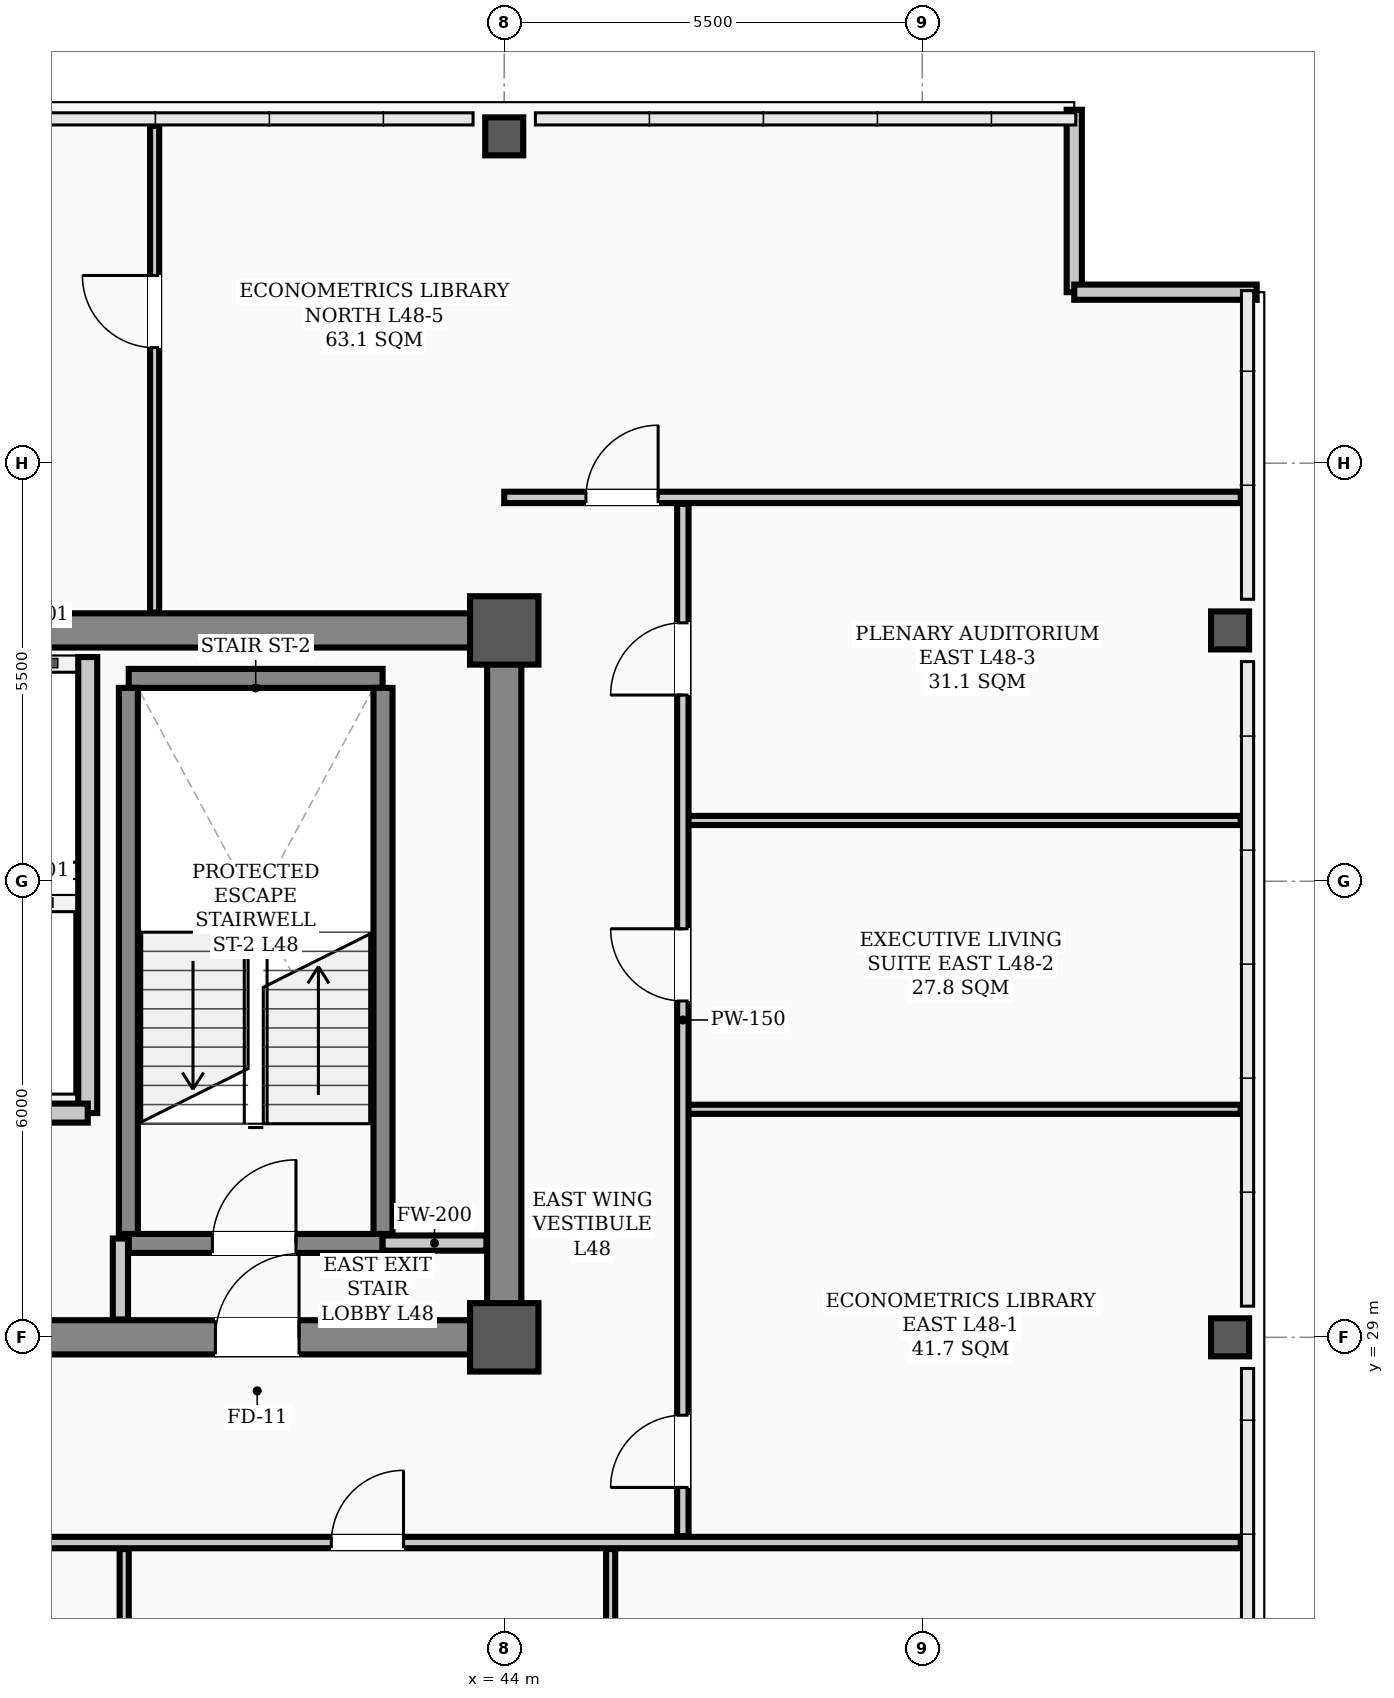
"""IFC4 building model, lengths in metres.
Left out: names, types, materials, properties, quantities, classifications, styles, units other than length and angle.
Written with IfcOpenShell. Run it as: python <this file> out.ifc"""

import sys

from ifc_helpers import new_model, si_unit, direction, frame, frame_2d, origin, origin_2d, place, context, subcontext, project, spatial, rectangle, hollow_rectangle, extrude, element, fill, save


model = new_model("IFC4")
c1 = context("Model", 3, precision=1e-05, world=origin(), true_north=direction((0.0, 1.0)))
c2 = subcontext(c1, "Body", "Model", "MODEL_VIEW")
j1 = project(units=[si_unit("LENGTHUNIT", "METRE"), si_unit("PLANEANGLEUNIT", "RADIAN")], contexts=[c1])
p1 = place(None, origin())
s1 = spatial("IfcSite", under=j1, at=p1, CompositionType="ELEMENT")
p2 = place(p1, origin())
s2 = spatial("IfcBuilding", under=s1, at=p2, CompositionType="ELEMENT")
p3 = place(p2, frame((0.0, 0.0, 192.9)))
s3 = spatial("IfcBuildingStorey", under=s2, at=p3, CompositionType="ELEMENT", Elevation=192.9)
for number, where, z_axis, x_axis in (
    (1, (44.0, 29.0, 0.0), (0.0, 0.0, 1.0), (1.0, 0.0, 0.0)),
    (2, (44.0, 38.3, 0.0), (0.0, 0.0, 1.0), (1.0, 0.0, 0.0)),
):
    element("IfcColumn", number, at=place(p3, frame(where, z_axis=z_axis, x_axis=x_axis)), inside=s3, PredefinedType="COLUMN", context=c2, shape_type="SweptSolid", body=[
        extrude(hollow_rectangle(XDim=0.9, YDim=0.9, WallThickness=0.035, InnerFilletRadius=0.017, OuterFilletRadius=0.052, at=origin_2d()), origin(), (0.0, 0.0, 1.0), 3.9),
    ])
p4 = place(p3, frame((44.0, 44.8, 0.0), z_axis=(0.0, 0.0, 1.0), x_axis=(1.0, 0.0, 0.0)))
e3 = element("IfcColumn", 3, at=p4, inside=s3, PredefinedType="COLUMN", context=c2, shape_type="SweptSolid", body=[
    extrude(hollow_rectangle(XDim=0.5, YDim=0.5, WallThickness=0.024, InnerFilletRadius=0.012, OuterFilletRadius=0.036, at=origin_2d()), origin(), (0.0, 0.0, 1.0), 3.66),
])
for number, where, z_axis, x_axis in (
    (4, (53.55, 29.0, 0.0), (0.0, 0.0, 1.0), (1.0, 0.0, 0.0)),
    (5, (53.55, 38.3, 0.0), (0.0, 0.0, 1.0), (1.0, 0.0, 0.0)),
):
    element("IfcColumn", number, at=place(p3, frame(where, z_axis=z_axis, x_axis=x_axis)), inside=s3, PredefinedType="COLUMN", context=c2, shape_type="SweptSolid", body=[
        extrude(hollow_rectangle(XDim=0.5, YDim=0.5, WallThickness=0.024, InnerFilletRadius=0.012, OuterFilletRadius=0.036, at=origin_2d()), origin(), (0.0, 0.0, 1.0), 3.9),
    ])
for number, where, z_axis, x_axis in (
    (6, (51.5, 45.15, 0.0), (0.0, 0.0, 1.0), (0.0, -1.0, 0.0)),
    (7, (51.5, 42.75, 0.0), (0.0, 0.0, 1.0), (1.0, 0.0, 0.0)),
):
    element("IfcWall", number, at=place(p3, frame(where, z_axis=z_axis, x_axis=x_axis)), inside=s3, PredefinedType="PARAPET", context=c2, shape_type="SweptSolid", body=[
        extrude(rectangle(XDim=2.4, YDim=0.2, at=frame_2d((1.2, 0.0))), origin(), (0.0, 0.0, 1.0), 1.2),
    ])
p5 = place(p3, frame((13.5, 29.0, 0.0), z_axis=(0.0, 0.0, 1.0), x_axis=(1.0, 0.0, 0.0)))
e8 = element("IfcWall", 8, at=p5, inside=s3, PredefinedType="SHEAR", context=c2, shape_type="SweptSolid", body=[
    extrude(rectangle(XDim=30.5, YDim=0.45, at=frame_2d((15.25, 0.0))), origin(), (0.0, 0.0, 1.0), 3.66),
])
p6 = place(p5, frame((1.75, 0.0, 0.0)))
e9 = element("IfcOpeningElement", 9, at=p6, cuts=e8, PredefinedType="OPENING", context=c2, shape_type="SweptSolid", body=[
    extrude(rectangle(XDim=1.1, YDim=2.08, at=frame_2d((0.55, 1.04))), frame((0.0, 0.235, 0.0), z_axis=(0.0, -1.0, 0.0), x_axis=(1.0, 0.0, 0.0)), (0.0, 0.0, 1.0), 0.47),
])
p7 = place(p5, frame((26.7, 0.0, 0.0)))
e10 = element("IfcOpeningElement", 10, at=p7, cuts=e8, PredefinedType="OPENING", context=c2, shape_type="SweptSolid", body=[
    extrude(rectangle(XDim=1.1, YDim=2.08, at=frame_2d((0.55, 1.04))), frame((0.0, 0.235, 0.0), z_axis=(0.0, -1.0, 0.0), x_axis=(1.0, 0.0, 0.0)), (0.0, 0.0, 1.0), 0.47),
])
p8 = place(p5, frame((6.8, 0.0, 0.0)))
e11 = element("IfcOpeningElement", 11, at=p8, cuts=e8, PredefinedType="OPENING", context=c2, shape_type="SweptSolid", body=[
    extrude(rectangle(XDim=1.1, YDim=2.08, at=frame_2d((0.55, 1.04))), frame((0.0, 0.235, 0.0), z_axis=(0.0, -1.0, 0.0), x_axis=(1.0, 0.0, 0.0)), (0.0, 0.0, 1.0), 0.47),
])
p9 = place(p5, frame((13.2, 0.0, 0.0)))
e12 = element("IfcOpeningElement", 12, at=p9, cuts=e8, PredefinedType="OPENING", context=c2, shape_type="SweptSolid", body=[
    extrude(rectangle(XDim=1.6, YDim=2.08, at=frame_2d((0.8, 1.04))), frame((0.0, 0.235, 0.0), z_axis=(0.0, -1.0, 0.0), x_axis=(1.0, 0.0, 0.0)), (0.0, 0.0, 1.0), 0.47),
])
p10 = place(p5, frame((19.53, 0.0, 0.0)))
e13 = element("IfcOpeningElement", 13, at=p10, cuts=e8, PredefinedType="OPENING", context=c2, shape_type="SweptSolid", body=[
    extrude(rectangle(XDim=0.9, YDim=2.08, at=frame_2d((0.45, 1.04))), frame((0.0, 0.235, 0.0), z_axis=(0.0, -1.0, 0.0), x_axis=(1.0, 0.0, 0.0)), (0.0, 0.0, 1.0), 0.47),
])
p11 = place(p5, frame((21.57, 0.0, 0.0)))
e14 = element("IfcOpeningElement", 14, at=p11, cuts=e8, PredefinedType="OPENING", context=c2, shape_type="SweptSolid", body=[
    extrude(rectangle(XDim=0.9, YDim=2.08, at=frame_2d((0.45, 1.04))), frame((0.0, 0.235, 0.0), z_axis=(0.0, -1.0, 0.0), x_axis=(1.0, 0.0, 0.0)), (0.0, 0.0, 1.0), 0.47),
])
p12 = place(p3, frame((13.5, 38.3, 0.0), z_axis=(0.0, 0.0, 1.0), x_axis=(1.0, 0.0, 0.0)))
e15 = element("IfcWall", 15, at=p12, inside=s3, PredefinedType="SHEAR", context=c2, shape_type="SweptSolid", body=[
    extrude(rectangle(XDim=30.5, YDim=0.45, at=frame_2d((15.25, 0.0))), origin(), (0.0, 0.0, 1.0), 3.66),
])
p13 = place(p3, frame((44.0, 29.35, 0.0), z_axis=(0.0, 0.0, 1.0), x_axis=(0.0, 1.0, 0.0)))
e16 = element("IfcWall", 16, at=p13, inside=s3, PredefinedType="SHEAR", context=c2, shape_type="SweptSolid", body=[
    extrude(rectangle(XDim=8.6, YDim=0.45, at=frame_2d((4.3, 0.0))), origin(), (0.0, 0.0, 1.0), 3.66),
])
p14 = place(p3, frame((39.06, 30.235, 0.0), z_axis=(0.0, 0.0, 1.0), x_axis=(1.0, 0.0, 0.0)))
e17 = element("IfcWall", 17, at=p14, inside=s3, PredefinedType="STANDARD", context=c2, shape_type="SweptSolid", body=[
    extrude(rectangle(XDim=3.34, YDim=0.25, at=frame_2d((1.67, 0.0))), origin(), (0.0, 0.0, 1.0), 3.66),
])
p15 = place(p14, frame((1.1, 0.0, 0.0)))
e18 = element("IfcOpeningElement", 18, at=p15, cuts=e17, PredefinedType="OPENING", context=c2, shape_type="SweptSolid", body=[
    extrude(rectangle(XDim=1.1, YDim=2.08, at=frame_2d((0.55, 1.04))), frame((0.0, 0.135, 0.0), z_axis=(0.0, -1.0, 0.0), x_axis=(1.0, 0.0, 0.0)), (0.0, 0.0, 1.0), 0.27),
])
p16 = place(p3, frame((39.06, 37.669, 0.0), z_axis=(0.0, 0.0, 1.0), x_axis=(1.0, 0.0, 0.0)))
e19 = element("IfcWall", 19, at=p16, inside=s3, PredefinedType="STANDARD", context=c2, shape_type="SweptSolid", body=[
    extrude(rectangle(XDim=3.34, YDim=0.25, at=frame_2d((1.67, 0.0))), origin(), (0.0, 0.0, 1.0), 3.66),
])
for number, where, z_axis, x_axis in (
    (20, (39.055, 30.36, 0.0), (0.0, 0.0, 1.0), (0.0, 1.0, 0.0)),
    (21, (42.405, 30.36, 0.0), (0.0, 0.0, 1.0), (0.0, 1.0, 0.0)),
):
    element("IfcWall", number, at=place(p3, frame(where, z_axis=z_axis, x_axis=x_axis)), inside=s3, PredefinedType="STANDARD", context=c2, shape_type="SweptSolid", body=[
        extrude(rectangle(XDim=7.184, YDim=0.25, at=frame_2d((3.592, 0.0))), origin(), (0.0, 0.0, 1.0), 3.66),
    ])
p17 = place(p3, frame((38.52, 31.95, 0.0), z_axis=(0.0, 0.0, 1.0), x_axis=(0.0, 1.0, 0.0)))
e22 = element("IfcWall", 22, at=p17, inside=s3, PredefinedType="STANDARD", context=c2, shape_type="SweptSolid", body=[
    extrude(rectangle(XDim=6.0, YDim=0.25, at=frame_2d((3.0, 0.0))), origin(), (0.0, 0.0, 1.0), 2.24),
])
p18 = place(p3, frame((36.62, 31.95, 0.0), z_axis=(0.0, 0.0, 1.0), x_axis=(1.0, 0.0, 0.0)))
e23 = element("IfcWall", 23, at=p18, inside=s3, PredefinedType="STANDARD", context=c2, shape_type="SweptSolid", body=[
    extrude(rectangle(XDim=1.9, YDim=0.25, at=frame_2d((0.95, 0.0))), origin(), (0.0, 0.0, 1.0), 3.48),
])
p19 = place(p3, frame((42.4, 30.24, 0.0), z_axis=(0.0, 0.0, 1.0), x_axis=(1.0, 0.0, 0.0)))
e24 = element("IfcWall", 24, at=p19, inside=s3, PredefinedType="STANDARD", context=c2, shape_type="SweptSolid", body=[
    extrude(rectangle(XDim=1.365, YDim=0.2, at=frame_2d((0.683, 0.0))), origin(), (0.0, 0.0, 1.0), 2.24),
])
p20 = place(p3, frame((10.31, 26.3, 0.0), z_axis=(0.0, 0.0, 1.0), x_axis=(1.0, 0.0, 0.0)))
e25 = element("IfcWall", 25, at=p20, inside=s3, PredefinedType="PARTITIONING", context=c2, shape_type="SweptSolid", body=[
    extrude(rectangle(XDim=43.38, YDim=0.15, at=frame_2d((21.69, 0.0))), origin(), (0.0, 0.0, 1.0), 2.24),
])
p21 = place(p20, frame((4.47, 0.0, 0.0)))
e26 = element("IfcOpeningElement", 26, at=p21, cuts=e25, PredefinedType="OPENING", context=c2, shape_type="SweptSolid", body=[
    extrude(rectangle(XDim=0.95, YDim=2.08, at=frame_2d((0.475, 1.04))), frame((0.0, 0.085, 0.0), z_axis=(0.0, -1.0, 0.0), x_axis=(1.0, 0.0, 0.0)), (0.0, 0.0, 1.0), 0.17),
])
p22 = place(p20, frame((10.815, 0.0, 0.0)))
e27 = element("IfcOpeningElement", 27, at=p22, cuts=e25, PredefinedType="OPENING", context=c2, shape_type="SweptSolid", body=[
    extrude(rectangle(XDim=0.95, YDim=2.08, at=frame_2d((0.475, 1.04))), frame((0.0, 0.085, 0.0), z_axis=(0.0, -1.0, 0.0), x_axis=(1.0, 0.0, 0.0)), (0.0, 0.0, 1.0), 0.17),
])
p23 = place(p20, frame((17.715, 0.0, 0.0)))
e28 = element("IfcOpeningElement", 28, at=p23, cuts=e25, PredefinedType="OPENING", context=c2, shape_type="SweptSolid", body=[
    extrude(rectangle(XDim=0.95, YDim=2.08, at=frame_2d((0.475, 1.04))), frame((0.0, 0.085, 0.0), z_axis=(0.0, -1.0, 0.0), x_axis=(1.0, 0.0, 0.0)), (0.0, 0.0, 1.0), 0.17),
])
p24 = place(p20, frame((24.815, 0.0, 0.0)))
e29 = element("IfcOpeningElement", 29, at=p24, cuts=e25, PredefinedType="OPENING", context=c2, shape_type="SweptSolid", body=[
    extrude(rectangle(XDim=0.95, YDim=2.08, at=frame_2d((0.475, 1.04))), frame((0.0, 0.085, 0.0), z_axis=(0.0, -1.0, 0.0), x_axis=(1.0, 0.0, 0.0)), (0.0, 0.0, 1.0), 0.17),
])
p25 = place(p20, frame((31.415, 0.0, 0.0)))
e30 = element("IfcOpeningElement", 30, at=p25, cuts=e25, PredefinedType="OPENING", context=c2, shape_type="SweptSolid", body=[
    extrude(rectangle(XDim=0.95, YDim=2.08, at=frame_2d((0.475, 1.04))), frame((0.0, 0.085, 0.0), z_axis=(0.0, -1.0, 0.0), x_axis=(1.0, 0.0, 0.0)), (0.0, 0.0, 1.0), 0.17),
])
for number, where, z_axis, x_axis in (
    (31, (46.35, 32.0, 0.0), (0.0, 0.0, 1.0), (1.0, 0.0, 0.0)),
    (32, (46.35, 35.8, 0.0), (0.0, 0.0, 1.0), (1.0, 0.0, 0.0)),
):
    element("IfcWall", number, at=place(p3, frame(where, z_axis=z_axis, x_axis=x_axis)), inside=s3, PredefinedType="PARTITIONING", context=c2, shape_type="SweptSolid", body=[
        extrude(rectangle(XDim=7.34, YDim=0.12, at=frame_2d((3.67, 0.0))), origin(), (0.0, 0.0, 1.0), 3.66),
    ])
p26 = place(p3, frame((44.0, 40.05, 0.0), z_axis=(0.0, 0.0, 1.0), x_axis=(1.0, 0.0, 0.0)))
e33 = element("IfcWall", 33, at=p26, inside=s3, PredefinedType="PARTITIONING", context=c2, shape_type="SweptSolid", body=[
    extrude(rectangle(XDim=9.69, YDim=0.15, at=frame_2d((4.845, 0.0))), origin(), (0.0, 0.0, 1.0), 2.24),
])
p27 = place(p26, frame((1.075, 0.0, 0.0)))
e34 = element("IfcOpeningElement", 34, at=p27, cuts=e33, PredefinedType="OPENING", context=c2, shape_type="SweptSolid", body=[
    extrude(rectangle(XDim=0.95, YDim=2.08, at=frame_2d((0.475, 1.04))), frame((0.0, 0.085, 0.0), z_axis=(0.0, -1.0, 0.0), x_axis=(1.0, 0.0, 0.0)), (0.0, 0.0, 1.0), 0.17),
])
p28 = place(p3, frame((38.95, 29.235, 0.0), z_axis=(0.0, 0.0, 1.0), x_axis=(0.0, 1.0, 0.0)))
e35 = element("IfcWall", 35, at=p28, inside=s3, PredefinedType="STANDARD", context=c2, shape_type="SweptSolid", body=[
    extrude(rectangle(XDim=1.065, YDim=0.2, at=frame_2d((0.532, 0.0))), origin(), (0.0, 0.0, 1.0), 2.24),
])
p29 = place(p3, frame((46.35, 26.385, 0.0), z_axis=(0.0, 0.0, 1.0), x_axis=(0.0, 1.0, 0.0)))
e36 = element("IfcWall", 36, at=p29, inside=s3, PredefinedType="PARTITIONING", context=c2, shape_type="SweptSolid", body=[
    extrude(rectangle(XDim=13.58, YDim=0.15, at=frame_2d((6.79, 0.0))), origin(), (0.0, 0.0, 1.0), 2.24),
])
p30 = place(p29, frame((0.64, 0.0, 0.0)))
e37 = element("IfcOpeningElement", 37, at=p30, cuts=e36, PredefinedType="OPENING", context=c2, shape_type="SweptSolid", body=[
    extrude(rectangle(XDim=0.95, YDim=2.08, at=frame_2d((0.475, 1.04))), frame((0.0, 0.085, 0.0), z_axis=(0.0, -1.0, 0.0), x_axis=(1.0, 0.0, 0.0)), (0.0, 0.0, 1.0), 0.17),
])
p31 = place(p29, frame((7.04, 0.0, 0.0)))
e38 = element("IfcOpeningElement", 38, at=p31, cuts=e36, PredefinedType="OPENING", context=c2, shape_type="SweptSolid", body=[
    extrude(rectangle(XDim=0.95, YDim=2.08, at=frame_2d((0.475, 1.04))), frame((0.0, 0.085, 0.0), z_axis=(0.0, -1.0, 0.0), x_axis=(1.0, 0.0, 0.0)), (0.0, 0.0, 1.0), 0.17),
])
p32 = place(p29, frame((11.065, 0.0, 0.0)))
e39 = element("IfcOpeningElement", 39, at=p32, cuts=e36, PredefinedType="OPENING", context=c2, shape_type="SweptSolid", body=[
    extrude(rectangle(XDim=0.95, YDim=2.08, at=frame_2d((0.475, 1.04))), frame((0.0, 0.085, 0.0), z_axis=(0.0, -1.0, 0.0), x_axis=(1.0, 0.0, 0.0)), (0.0, 0.0, 1.0), 0.17),
])
p33 = place(p3, frame((39.0, 17.06, 0.0), z_axis=(0.0, 0.0, 1.0), x_axis=(0.0, 1.0, 0.0)))
e40 = element("IfcWall", 40, at=p33, inside=s3, PredefinedType="PARTITIONING", context=c2, shape_type="SweptSolid", body=[
    extrude(rectangle(XDim=9.155, YDim=0.12, at=frame_2d((4.578, 0.0))), origin(), (0.0, 0.0, 1.0), 2.24),
])
p34 = place(p3, frame((45.4, 17.06, 0.0), z_axis=(0.0, 0.0, 1.0), x_axis=(0.0, 1.0, 0.0)))
e41 = element("IfcWall", 41, at=p34, inside=s3, PredefinedType="PARTITIONING", context=c2, shape_type="SweptSolid", body=[
    extrude(rectangle(XDim=9.155, YDim=0.12, at=frame_2d((4.578, 0.0))), origin(), (0.0, 0.0, 1.0), 2.24),
])
p35 = place(p34, frame((7.165, 0.0, 0.0)))
e42 = element("IfcOpeningElement", 42, at=p35, cuts=e41, PredefinedType="OPENING", context=c2, shape_type="SweptSolid", body=[
    extrude(rectangle(XDim=0.95, YDim=2.08, at=frame_2d((0.475, 1.04))), frame((0.0, 0.07, 0.0), z_axis=(0.0, -1.0, 0.0), x_axis=(1.0, 0.0, 0.0)), (0.0, 0.0, 1.0), 0.14),
])
p36 = place(p3, frame((39.4, 38.535, 0.0), z_axis=(0.0, 0.0, 1.0), x_axis=(0.0, 1.0, 0.0)))
e43 = element("IfcWall", 43, at=p36, inside=s3, PredefinedType="PARTITIONING", context=c2, shape_type="SweptSolid", body=[
    extrude(rectangle(XDim=6.405, YDim=0.12, at=frame_2d((3.203, 0.0))), origin(), (0.0, 0.0, 1.0), 2.24),
])
p37 = place(p36, frame((3.485, 0.0, 0.0)))
e44 = element("IfcOpeningElement", 44, at=p37, cuts=e43, PredefinedType="OPENING", context=c2, shape_type="SweptSolid", body=[
    extrude(rectangle(XDim=0.95, YDim=2.08, at=frame_2d((0.475, 1.04))), frame((0.0, 0.07, 0.0), z_axis=(0.0, -1.0, 0.0), x_axis=(1.0, 0.0, 0.0)), (0.0, 0.0, 1.0), 0.14),
])
p38 = place(p15, origin())
e45 = element("IfcDoor", 45, at=p38, inside=s3, OperationType="SINGLE_SWING_RIGHT", PredefinedType="DOOR", context=c2, shape_type="SweptSolid", body=[
    extrude(rectangle(XDim=1.1, YDim=2.08, at=frame_2d((0.55, 1.04))), frame((0.0, 0.025, 0.0), z_axis=(0.0, -1.0, 0.0), x_axis=(1.0, 0.0, 0.0)), (0.0, 0.0, 1.0), 0.05),
])
fill(e18, e45)
p39 = place(p7, origin())
e46 = element("IfcDoor", 46, at=p39, inside=s3, OperationType="SINGLE_SWING_RIGHT", PredefinedType="DOOR", context=c2, shape_type="SweptSolid", body=[
    extrude(rectangle(XDim=1.1, YDim=2.08, at=frame_2d((0.55, 1.04))), frame((0.0, 0.025, 0.0), z_axis=(0.0, -1.0, 0.0), x_axis=(1.0, 0.0, 0.0)), (0.0, 0.0, 1.0), 0.05),
])
fill(e10, e46)
p40 = place(p25, origin())
e47 = element("IfcDoor", 47, at=p40, inside=s3, OperationType="SINGLE_SWING_RIGHT", PredefinedType="DOOR", context=c2, shape_type="SweptSolid", body=[
    extrude(rectangle(XDim=0.95, YDim=2.08, at=frame_2d((0.475, 1.04))), frame((0.0, 0.025, 0.0), z_axis=(0.0, -1.0, 0.0), x_axis=(1.0, 0.0, 0.0)), (0.0, 0.0, 1.0), 0.05),
])
fill(e30, e47)
p41 = place(p30, origin())
e48 = element("IfcDoor", 48, at=p41, inside=s3, OperationType="SINGLE_SWING_LEFT", PredefinedType="DOOR", context=c2, shape_type="SweptSolid", body=[
    extrude(rectangle(XDim=0.95, YDim=2.08, at=frame_2d((0.475, 1.04))), frame((0.0, 0.025, 0.0), z_axis=(0.0, -1.0, 0.0), x_axis=(1.0, 0.0, 0.0)), (0.0, 0.0, 1.0), 0.05),
])
fill(e37, e48)
p42 = place(p31, origin())
e49 = element("IfcDoor", 49, at=p42, inside=s3, OperationType="SINGLE_SWING_RIGHT", PredefinedType="DOOR", context=c2, shape_type="SweptSolid", body=[
    extrude(rectangle(XDim=0.95, YDim=2.08, at=frame_2d((0.475, 1.04))), frame((0.0, 0.025, 0.0), z_axis=(0.0, -1.0, 0.0), x_axis=(1.0, 0.0, 0.0)), (0.0, 0.0, 1.0), 0.05),
])
fill(e38, e49)
p43 = place(p32, origin())
e50 = element("IfcDoor", 50, at=p43, inside=s3, OperationType="SINGLE_SWING_LEFT", PredefinedType="DOOR", context=c2, shape_type="SweptSolid", body=[
    extrude(rectangle(XDim=0.95, YDim=2.08, at=frame_2d((0.475, 1.04))), frame((0.0, 0.025, 0.0), z_axis=(0.0, -1.0, 0.0), x_axis=(1.0, 0.0, 0.0)), (0.0, 0.0, 1.0), 0.05),
])
fill(e39, e50)
p44 = place(p27, origin())
e51 = element("IfcDoor", 51, at=p44, inside=s3, OperationType="SINGLE_SWING_RIGHT", PredefinedType="DOOR", context=c2, shape_type="SweptSolid", body=[
    extrude(rectangle(XDim=0.95, YDim=2.08, at=frame_2d((0.475, 1.04))), frame((0.0, 0.025, 0.0), z_axis=(0.0, -1.0, 0.0), x_axis=(1.0, 0.0, 0.0)), (0.0, 0.0, 1.0), 0.05),
])
fill(e34, e51)
p45 = place(p37, origin())
e52 = element("IfcDoor", 52, at=p45, inside=s3, OperationType="SINGLE_SWING_RIGHT", PredefinedType="DOOR", context=c2, shape_type="SweptSolid", body=[
    extrude(rectangle(XDim=0.95, YDim=2.08, at=frame_2d((0.475, 1.04))), frame((0.0, 0.025, 0.0), z_axis=(0.0, -1.0, 0.0), x_axis=(1.0, 0.0, 0.0)), (0.0, 0.0, 1.0), 0.05),
])
fill(e44, e52)
save(model, sys.argv[1])
